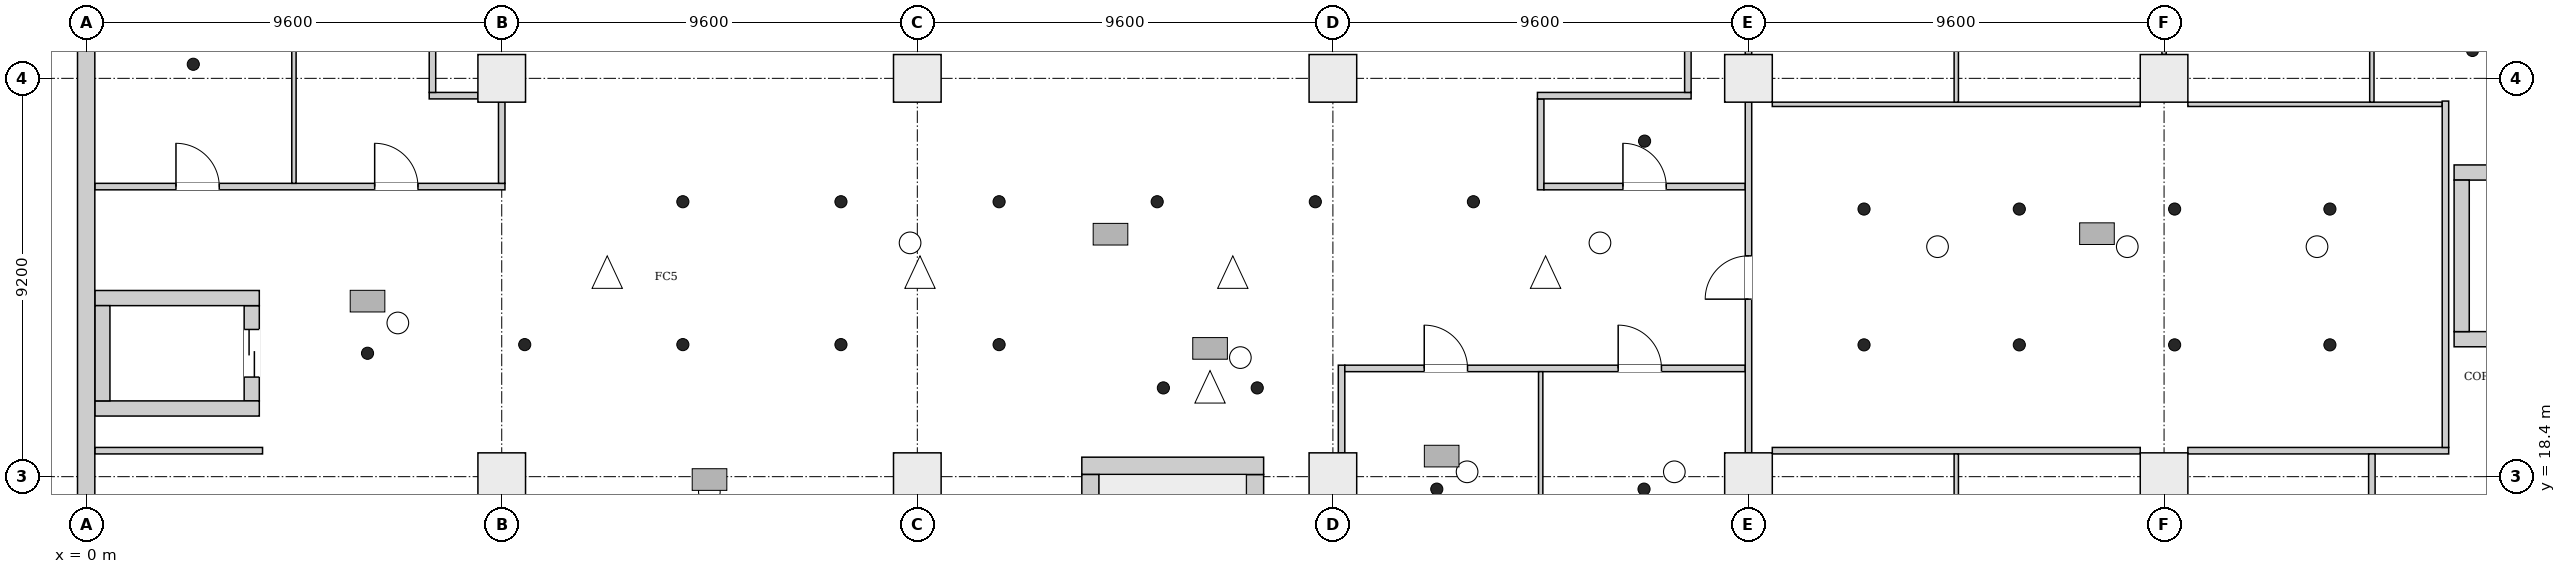
"""IFC4 building model, lengths in metres.
Left out: names, types, materials, properties, quantities, classifications, styles, units other than length and angle.
Written with IfcOpenShell. Run it as: python <this file> out.ifc"""

import sys

from ifc_helpers import new_model, si_unit, direction, frame, frame_2d, origin, origin_2d, place, context, subcontext, project, spatial, rectangle, extrude, element, fill, save


model = new_model("IFC4")
c1 = context("Model", 3, precision=1e-05, world=origin(), true_north=direction((0.0, 1.0)))
c2 = subcontext(c1, "Body", "Model", "MODEL_VIEW")
j1 = project(units=[si_unit("LENGTHUNIT", "METRE"), si_unit("PLANEANGLEUNIT", "RADIAN")], contexts=[c1])
p1 = place(None, origin())
s1 = spatial("IfcSite", under=j1, at=p1, CompositionType="ELEMENT")
p2 = place(p1, origin())
s2 = spatial("IfcBuilding", under=s1, at=p2, CompositionType="ELEMENT")
p3 = place(p2, frame((0.0, 0.0, 26.7)))
s3 = spatial("IfcBuildingStorey", under=s2, at=p3, CompositionType="ELEMENT", Elevation=26.7)
p4 = place(p3, frame((0.0, -0.2, 0.0), z_axis=(0.0, 0.0, 1.0), x_axis=(0.0, 1.0, 0.0)))
e1 = element("IfcWall", 1, at=p4, inside=s3, PredefinedType="SHEAR", context=c2, shape_type="SweptSolid", body=[
    extrude(rectangle(XDim=46.88, YDim=0.4, at=frame_2d((23.44, 0.0))), origin(), (0.0, 0.0, 1.0), 5.2),
])
p5 = place(p3, frame((23.0, 18.65, 0.0), z_axis=(0.0, 0.0, 1.0), x_axis=(1.0, 0.0, 0.0)))
e2 = element("IfcWall", 2, at=p5, inside=s3, PredefinedType="SHEAR", context=c2, shape_type="SweptSolid", body=[
    extrude(rectangle(XDim=4.2, YDim=0.4, at=frame_2d((2.1, 0.0))), origin(), (0.0, 0.0, 1.0), 5.2),
])
for number, where, z_axis, x_axis in (
    (3, (23.2, 11.85, 0.0), (0.0, 0.0, 1.0), (0.0, 1.0, 0.0)),
    (4, (27.0, 11.85, 0.0), (0.0, 0.0, 1.0), (0.0, 1.0, 0.0)),
):
    element("IfcWall", number, at=place(p3, frame(where, z_axis=z_axis, x_axis=x_axis)), inside=s3, PredefinedType="SHEAR", context=c2, shape_type="SweptSolid", body=[
        extrude(rectangle(XDim=6.6, YDim=0.4, at=frame_2d((3.3, 0.0))), origin(), (0.0, 0.0, 1.0), 5.2),
    ])
for number, where, z_axis, x_axis in (
    (5, (0.2, 19.975, 0.0), (0.0, 0.0, 1.0), (1.0, 0.0, 0.0)),
    (6, (0.2, 22.525, 0.0), (0.0, 0.0, 1.0), (1.0, 0.0, 0.0)),
):
    element("IfcWall", number, at=place(p3, frame(where, z_axis=z_axis, x_axis=x_axis)), inside=s3, PredefinedType="SHEAR", context=c2, shape_type="SweptSolid", body=[
        extrude(rectangle(XDim=3.8, YDim=0.35, at=frame_2d((1.9, 0.0))), origin(), (0.0, 0.0, 1.0), 5.2),
    ])
p6 = place(p3, frame((0.375, 20.15, 0.0), z_axis=(0.0, 0.0, 1.0), x_axis=(0.0, 1.0, 0.0)))
e7 = element("IfcWall", 7, at=p6, inside=s3, PredefinedType="SHEAR", context=c2, shape_type="SweptSolid", body=[
    extrude(rectangle(XDim=2.2, YDim=0.35, at=frame_2d((1.1, 0.0))), origin(), (0.0, 0.0, 1.0), 5.2),
])
p7 = place(p3, frame((3.825, 20.15, 0.0), z_axis=(0.0, 0.0, 1.0), x_axis=(0.0, 1.0, 0.0)))
e8 = element("IfcWall", 8, at=p7, inside=s3, PredefinedType="SHEAR", context=c2, shape_type="SweptSolid", body=[
    extrude(rectangle(XDim=2.2, YDim=0.35, at=frame_2d((1.1, 0.0))), origin(), (0.0, 0.0, 1.0), 5.2),
])
p8 = place(p7, frame((0.55, 0.0, 0.0)))
e9 = element("IfcOpeningElement", 9, at=p8, cuts=e8, PredefinedType="OPENING", context=c2, shape_type="SweptSolid", body=[
    extrude(rectangle(XDim=1.1, YDim=2.1, at=frame_2d((0.55, 1.05))), frame((0.0, 0.185, 0.0), z_axis=(0.0, -1.0, 0.0), x_axis=(1.0, 0.0, 0.0)), (0.0, 0.0, 1.0), 0.37),
])
for number, where, z_axis, x_axis in (
    (10, (54.7, 21.575, 0.0), (0.0, 0.0, 1.0), (1.0, 0.0, 0.0)),
    (11, (54.7, 25.425, 0.0), (0.0, 0.0, 1.0), (1.0, 0.0, 0.0)),
):
    element("IfcWall", number, at=place(p3, frame(where, z_axis=z_axis, x_axis=x_axis)), inside=s3, PredefinedType="SHEAR", context=c2, shape_type="SweptSolid", body=[
        extrude(rectangle(XDim=2.7, YDim=0.35, at=frame_2d((1.35, 0.0))), origin(), (0.0, 0.0, 1.0), 5.2),
    ])
p9 = place(p3, frame((54.875, 21.75, 0.0), z_axis=(0.0, 0.0, 1.0), x_axis=(0.0, 1.0, 0.0)))
e12 = element("IfcWall", 12, at=p9, inside=s3, PredefinedType="SHEAR", context=c2, shape_type="SweptSolid", body=[
    extrude(rectangle(XDim=3.5, YDim=0.35, at=frame_2d((1.75, 0.0))), origin(), (0.0, 0.0, 1.0), 5.2),
])
for number, where, z_axis, x_axis in (
    (13, (9.6, 18.4, 0.0), (0.0, 0.0, 1.0), (1.0, 0.0, 0.0)),
    (14, (19.2, 18.4, 0.0), (0.0, 0.0, 1.0), (1.0, 0.0, 0.0)),
    (15, (28.8, 18.4, 0.0), (0.0, 0.0, 1.0), (1.0, 0.0, 0.0)),
    (16, (38.4, 18.4, 0.0), (0.0, 0.0, 1.0), (1.0, 0.0, 0.0)),
    (17, (48.0, 18.4, 0.0), (0.0, 0.0, 1.0), (1.0, 0.0, 0.0)),
    (18, (9.6, 27.6, 0.0), (0.0, 0.0, 1.0), (1.0, 0.0, 0.0)),
    (19, (19.2, 27.6, 0.0), (0.0, 0.0, 1.0), (1.0, 0.0, 0.0)),
    (20, (28.8, 27.6, 0.0), (0.0, 0.0, 1.0), (1.0, 0.0, 0.0)),
    (21, (38.4, 27.6, 0.0), (0.0, 0.0, 1.0), (1.0, 0.0, 0.0)),
    (22, (48.0, 27.6, 0.0), (0.0, 0.0, 1.0), (1.0, 0.0, 0.0)),
):
    element("IfcColumn", number, at=place(p3, frame(where, z_axis=z_axis, x_axis=x_axis)), inside=s3, PredefinedType="COLUMN", context=c2, shape_type="SweptSolid", body=[
        extrude(rectangle(XDim=1.1, YDim=1.1, at=origin_2d()), origin(), (0.0, 0.0, 1.0), 5.2),
    ])
p10 = place(p3, frame((0.206, 19.0, 0.0), z_axis=(0.0, 0.0, 1.0), x_axis=(1.0, 0.0, 0.0)))
e23 = element("IfcWall", 23, at=p10, inside=s3, PredefinedType="PARTITIONING", context=c2, shape_type="SweptSolid", body=[
    extrude(rectangle(XDim=3.869, YDim=0.15, at=frame_2d((1.935, 0.0))), origin(), (0.0, 0.0, 1.0), 4.85),
])
p11 = place(p3, frame((0.206, 25.1, 0.0), z_axis=(0.0, 0.0, 1.0), x_axis=(1.0, 0.0, 0.0)))
e24 = element("IfcWall", 24, at=p11, inside=s3, PredefinedType="PARTITIONING", context=c2, shape_type="SweptSolid", body=[
    extrude(rectangle(XDim=9.469, YDim=0.15, at=frame_2d((4.734, 0.0))), origin(), (0.0, 0.0, 1.0), 4.85),
])
p12 = place(p11, frame((1.869, 0.0, 0.0)))
e25 = element("IfcOpeningElement", 25, at=p12, cuts=e24, PredefinedType="OPENING", context=c2, shape_type="SweptSolid", body=[
    extrude(rectangle(XDim=1.0, YDim=2.1, at=frame_2d((0.5, 1.05))), frame((0.0, 0.085, 0.0), z_axis=(0.0, -1.0, 0.0), x_axis=(1.0, 0.0, 0.0)), (0.0, 0.0, 1.0), 0.17),
])
p13 = place(p11, frame((6.459, 0.0, 0.0)))
e26 = element("IfcOpeningElement", 26, at=p13, cuts=e24, PredefinedType="OPENING", context=c2, shape_type="SweptSolid", body=[
    extrude(rectangle(XDim=1.0, YDim=2.1, at=frame_2d((0.5, 1.05))), frame((0.0, 0.085, 0.0), z_axis=(0.0, -1.0, 0.0), x_axis=(1.0, 0.0, 0.0)), (0.0, 0.0, 1.0), 0.17),
])
p14 = place(p3, frame((4.8, 25.175, 0.0), z_axis=(0.0, 0.0, 1.0), x_axis=(0.0, 1.0, 0.0)))
e27 = element("IfcWall", 27, at=p14, inside=s3, PredefinedType="PARTITIONING", context=c2, shape_type="SweptSolid", body=[
    extrude(rectangle(XDim=9.4, YDim=0.1, at=frame_2d((4.7, 0.0))), origin(), (0.0, 0.0, 1.0), 4.85),
])
p15 = place(p3, frame((7.925, 27.2, 0.0), z_axis=(0.0, 0.0, 1.0), x_axis=(1.0, 0.0, 0.0)))
e28 = element("IfcWall", 28, at=p15, inside=s3, PredefinedType="PARTITIONING", context=c2, shape_type="SweptSolid", body=[
    extrude(rectangle(XDim=1.125, YDim=0.15, at=frame_2d((0.562, 0.0))), origin(), (0.0, 0.0, 1.0), 4.85),
])
p16 = place(p3, frame((8.0, 27.275, 0.0), z_axis=(0.0, 0.0, 1.0), x_axis=(0.0, 1.0, 0.0)))
e29 = element("IfcWall", 29, at=p16, inside=s3, PredefinedType="PARTITIONING", context=c2, shape_type="SweptSolid", body=[
    extrude(rectangle(XDim=3.65, YDim=0.15, at=frame_2d((1.825, 0.0))), origin(), (0.0, 0.0, 1.0), 4.85),
])
p17 = place(p3, frame((9.6, 25.175, 0.0), z_axis=(0.0, 0.0, 1.0), x_axis=(0.0, 1.0, 0.0)))
e30 = element("IfcWall", 30, at=p17, inside=s3, PredefinedType="PARTITIONING", context=c2, shape_type="SweptSolid", body=[
    extrude(rectangle(XDim=1.875, YDim=0.15, at=frame_2d((0.938, 0.0))), origin(), (0.0, 0.0, 1.0), 4.45),
])
p18 = place(p3, frame((29.0, 18.95, 0.0), z_axis=(0.0, 0.0, 1.0), x_axis=(0.0, 1.0, 0.0)))
e31 = element("IfcWall", 31, at=p18, inside=s3, PredefinedType="PARTITIONING", context=c2, shape_type="SweptSolid", body=[
    extrude(rectangle(XDim=2.025, YDim=0.15, at=frame_2d((1.013, 0.0))), origin(), (0.0, 0.0, 1.0), 4.45),
])
p19 = place(p3, frame((29.075, 20.9, 0.0), z_axis=(0.0, 0.0, 1.0), x_axis=(1.0, 0.0, 0.0)))
e32 = element("IfcWall", 32, at=p19, inside=s3, PredefinedType="PARTITIONING", context=c2, shape_type="SweptSolid", body=[
    extrude(rectangle(XDim=9.25, YDim=0.15, at=frame_2d((4.625, 0.0))), origin(), (0.0, 0.0, 1.0), 4.85),
])
p20 = place(p19, frame((1.835, 0.0, 0.0)))
e33 = element("IfcOpeningElement", 33, at=p20, cuts=e32, PredefinedType="OPENING", context=c2, shape_type="SweptSolid", body=[
    extrude(rectangle(XDim=1.0, YDim=2.1, at=frame_2d((0.5, 1.05))), frame((0.0, 0.085, 0.0), z_axis=(0.0, -1.0, 0.0), x_axis=(1.0, 0.0, 0.0)), (0.0, 0.0, 1.0), 0.17),
])
p21 = place(p19, frame((6.315, 0.0, 0.0)))
e34 = element("IfcOpeningElement", 34, at=p21, cuts=e32, PredefinedType="OPENING", context=c2, shape_type="SweptSolid", body=[
    extrude(rectangle(XDim=1.0, YDim=2.1, at=frame_2d((0.5, 1.05))), frame((0.0, 0.085, 0.0), z_axis=(0.0, -1.0, 0.0), x_axis=(1.0, 0.0, 0.0)), (0.0, 0.0, 1.0), 0.17),
])
p22 = place(p3, frame((33.6, 25.025, 0.0), z_axis=(0.0, 0.0, 1.0), x_axis=(0.0, 1.0, 0.0)))
e35 = element("IfcWall", 35, at=p22, inside=s3, PredefinedType="PARTITIONING", context=c2, shape_type="SweptSolid", body=[
    extrude(rectangle(XDim=2.1, YDim=0.15, at=frame_2d((1.05, 0.0))), origin(), (0.0, 0.0, 1.0), 4.85),
])
p23 = place(p3, frame((33.525, 27.2, 0.0), z_axis=(0.0, 0.0, 1.0), x_axis=(1.0, 0.0, 0.0)))
e36 = element("IfcWall", 36, at=p23, inside=s3, PredefinedType="PARTITIONING", context=c2, shape_type="SweptSolid", body=[
    extrude(rectangle(XDim=3.55, YDim=0.15, at=frame_2d((1.775, 0.0))), origin(), (0.0, 0.0, 1.0), 4.85),
])
p24 = place(p3, frame((33.6, 11.575, 0.0), z_axis=(0.0, 0.0, 1.0), x_axis=(0.0, 1.0, 0.0)))
e37 = element("IfcWall", 37, at=p24, inside=s3, PredefinedType="PARTITIONING", context=c2, shape_type="SweptSolid", body=[
    extrude(rectangle(XDim=9.25, YDim=0.1, at=frame_2d((4.625, 0.0))), origin(), (0.0, 0.0, 1.0), 4.85),
])
p25 = place(p3, frame((33.675, 25.1, 0.0), z_axis=(0.0, 0.0, 1.0), x_axis=(1.0, 0.0, 0.0)))
e38 = element("IfcWall", 38, at=p25, inside=s3, PredefinedType="PARTITIONING", context=c2, shape_type="SweptSolid", body=[
    extrude(rectangle(XDim=4.65, YDim=0.15, at=frame_2d((2.325, 0.0))), origin(), (0.0, 0.0, 1.0), 4.85),
])
p26 = place(p25, frame((1.825, 0.0, 0.0)))
e39 = element("IfcOpeningElement", 39, at=p26, cuts=e38, PredefinedType="OPENING", context=c2, shape_type="SweptSolid", body=[
    extrude(rectangle(XDim=1.0, YDim=2.1, at=frame_2d((0.5, 1.05))), frame((0.0, 0.085, 0.0), z_axis=(0.0, -1.0, 0.0), x_axis=(1.0, 0.0, 0.0)), (0.0, 0.0, 1.0), 0.17),
])
p27 = place(p3, frame((37.0, 27.275, 0.0), z_axis=(0.0, 0.0, 1.0), x_axis=(0.0, 1.0, 0.0)))
e40 = element("IfcWall", 40, at=p27, inside=s3, PredefinedType="PARTITIONING", context=c2, shape_type="SweptSolid", body=[
    extrude(rectangle(XDim=3.65, YDim=0.15, at=frame_2d((1.825, 0.0))), origin(), (0.0, 0.0, 1.0), 4.85),
])
p28 = place(p3, frame((38.4, 18.95, 0.0), z_axis=(0.0, 0.0, 1.0), x_axis=(0.0, 1.0, 0.0)))
e41 = element("IfcWall", 41, at=p28, inside=s3, PredefinedType="PARTITIONING", context=c2, shape_type="SweptSolid", body=[
    extrude(rectangle(XDim=8.1, YDim=0.15, at=frame_2d((4.05, 0.0))), origin(), (0.0, 0.0, 1.0), 4.45),
])
p29 = place(p28, frame((3.55, 0.0, 0.0)))
e42 = element("IfcOpeningElement", 42, at=p29, cuts=e41, PredefinedType="OPENING", context=c2, shape_type="SweptSolid", body=[
    extrude(rectangle(XDim=1.0, YDim=2.1, at=frame_2d((0.5, 1.05))), frame((0.0, 0.085, 0.0), z_axis=(0.0, -1.0, 0.0), x_axis=(1.0, 0.0, 0.0)), (0.0, 0.0, 1.0), 0.17),
])
p30 = place(p3, frame((38.4, 28.15, 0.0), z_axis=(0.0, 0.0, 1.0), x_axis=(0.0, 1.0, 0.0)))
e43 = element("IfcWall", 43, at=p30, inside=s3, PredefinedType="PARTITIONING", context=c2, shape_type="SweptSolid", body=[
    extrude(rectangle(XDim=6.425, YDim=0.15, at=frame_2d((3.212, 0.0))), origin(), (0.0, 0.0, 1.0), 4.45),
])
p31 = place(p3, frame((38.95, 19.0, 0.0), z_axis=(0.0, 0.0, 1.0), x_axis=(1.0, 0.0, 0.0)))
e44 = element("IfcWall", 44, at=p31, inside=s3, PredefinedType="PARTITIONING", context=c2, shape_type="SweptSolid", body=[
    extrude(rectangle(XDim=8.5, YDim=0.15, at=frame_2d((4.25, 0.0))), origin(), (0.0, 0.0, 1.0), 4.85),
])
p32 = place(p3, frame((38.95, 27.0, 0.0), z_axis=(0.0, 0.0, 1.0), x_axis=(1.0, 0.0, 0.0)))
e45 = element("IfcWall", 45, at=p32, inside=s3, PredefinedType="PARTITIONING", context=c2, shape_type="SweptSolid", body=[
    extrude(rectangle(XDim=8.5, YDim=0.1, at=frame_2d((4.25, 0.0))), origin(), (0.0, 0.0, 1.0), 4.85),
])
p33 = place(p3, frame((43.2, 11.575, 0.0), z_axis=(0.0, 0.0, 1.0), x_axis=(0.0, 1.0, 0.0)))
e46 = element("IfcWall", 46, at=p33, inside=s3, PredefinedType="PARTITIONING", context=c2, shape_type="SweptSolid", body=[
    extrude(rectangle(XDim=7.35, YDim=0.1, at=frame_2d((3.675, 0.0))), origin(), (0.0, 0.0, 1.0), 4.85),
])
p34 = place(p3, frame((43.2, 27.05, 0.0), z_axis=(0.0, 0.0, 1.0), x_axis=(0.0, 1.0, 0.0)))
e47 = element("IfcWall", 47, at=p34, inside=s3, PredefinedType="PARTITIONING", context=c2, shape_type="SweptSolid", body=[
    extrude(rectangle(XDim=7.525, YDim=0.1, at=frame_2d((3.762, 0.0))), origin(), (0.0, 0.0, 1.0), 4.85),
])
p35 = place(p3, frame((48.0, 28.15, 0.0), z_axis=(0.0, 0.0, 1.0), x_axis=(0.0, 1.0, 0.0)))
e48 = element("IfcWall", 48, at=p35, inside=s3, PredefinedType="PARTITIONING", context=c2, shape_type="SweptSolid", body=[
    extrude(rectangle(XDim=6.425, YDim=0.1, at=frame_2d((3.212, 0.0))), origin(), (0.0, 0.0, 1.0), 4.85),
])
p36 = place(p3, frame((48.55, 19.0, 0.0), z_axis=(0.0, 0.0, 1.0), x_axis=(1.0, 0.0, 0.0)))
e49 = element("IfcWall", 49, at=p36, inside=s3, PredefinedType="PARTITIONING", context=c2, shape_type="SweptSolid", body=[
    extrude(rectangle(XDim=6.025, YDim=0.15, at=frame_2d((3.012, 0.0))), origin(), (0.0, 0.0, 1.0), 4.85),
])
p37 = place(p3, frame((48.55, 27.0, 0.0), z_axis=(0.0, 0.0, 1.0), x_axis=(1.0, 0.0, 0.0)))
e50 = element("IfcWall", 50, at=p37, inside=s3, PredefinedType="PARTITIONING", context=c2, shape_type="SweptSolid", body=[
    extrude(rectangle(XDim=5.875, YDim=0.1, at=frame_2d((2.938, 0.0))), origin(), (0.0, 0.0, 1.0), 4.85),
])
p38 = place(p3, frame((52.8, 11.575, 0.0), z_axis=(0.0, 0.0, 1.0), x_axis=(0.0, 1.0, 0.0)))
e51 = element("IfcWall", 51, at=p38, inside=s3, PredefinedType="PARTITIONING", context=c2, shape_type="SweptSolid", body=[
    extrude(rectangle(XDim=7.35, YDim=0.15, at=frame_2d((3.675, 0.0))), origin(), (0.0, 0.0, 1.0), 4.85),
])
p39 = place(p3, frame((52.8, 27.05, 0.0), z_axis=(0.0, 0.0, 1.0), x_axis=(0.0, 1.0, 0.0)))
e52 = element("IfcWall", 52, at=p39, inside=s3, PredefinedType="PARTITIONING", context=c2, shape_type="SweptSolid", body=[
    extrude(rectangle(XDim=7.525, YDim=0.1, at=frame_2d((3.762, 0.0))), origin(), (0.0, 0.0, 1.0), 4.85),
])
p40 = place(p3, frame((54.5, 19.075, 0.0), z_axis=(0.0, 0.0, 1.0), x_axis=(0.0, 1.0, 0.0)))
e53 = element("IfcWall", 53, at=p40, inside=s3, PredefinedType="PARTITIONING", context=c2, shape_type="SweptSolid", body=[
    extrude(rectangle(XDim=8.0, YDim=0.15, at=frame_2d((4.0, 0.0))), origin(), (0.0, 0.0, 1.0), 4.85),
])
p41 = place(p8, origin())
e54 = element("IfcDoor", 54, at=p41, inside=s3, OperationType="DOUBLE_DOOR_SLIDING", PredefinedType="DOOR", context=c2, shape_type="SweptSolid", body=[
    extrude(rectangle(XDim=1.1, YDim=2.1, at=frame_2d((0.55, 1.05))), frame((0.0, 0.025, 0.0), z_axis=(0.0, -1.0, 0.0), x_axis=(1.0, 0.0, 0.0)), (0.0, 0.0, 1.0), 0.05),
])
fill(e9, e54)
p42 = place(p20, origin())
e55 = element("IfcDoor", 55, at=p42, inside=s3, OperationType="SINGLE_SWING_RIGHT", PredefinedType="DOOR", context=c2, shape_type="SweptSolid", body=[
    extrude(rectangle(XDim=1.0, YDim=2.1, at=frame_2d((0.5, 1.05))), frame((0.0, 0.025, 0.0), z_axis=(0.0, -1.0, 0.0), x_axis=(1.0, 0.0, 0.0)), (0.0, 0.0, 1.0), 0.05),
])
fill(e33, e55)
p43 = place(p21, origin())
e56 = element("IfcDoor", 56, at=p43, inside=s3, OperationType="SINGLE_SWING_LEFT", PredefinedType="DOOR", context=c2, shape_type="SweptSolid", body=[
    extrude(rectangle(XDim=1.0, YDim=2.1, at=frame_2d((0.5, 1.05))), frame((0.0, 0.025, 0.0), z_axis=(0.0, -1.0, 0.0), x_axis=(1.0, 0.0, 0.0)), (0.0, 0.0, 1.0), 0.05),
])
fill(e34, e56)
p44 = place(p12, origin())
e57 = element("IfcDoor", 57, at=p44, inside=s3, OperationType="SINGLE_SWING_LEFT", PredefinedType="DOOR", context=c2, shape_type="SweptSolid", body=[
    extrude(rectangle(XDim=1.0, YDim=2.1, at=frame_2d((0.5, 1.05))), frame((0.0, 0.025, 0.0), z_axis=(0.0, -1.0, 0.0), x_axis=(1.0, 0.0, 0.0)), (0.0, 0.0, 1.0), 0.05),
])
fill(e25, e57)
p45 = place(p13, origin())
e58 = element("IfcDoor", 58, at=p45, inside=s3, OperationType="SINGLE_SWING_RIGHT", PredefinedType="DOOR", context=c2, shape_type="SweptSolid", body=[
    extrude(rectangle(XDim=1.0, YDim=2.1, at=frame_2d((0.5, 1.05))), frame((0.0, 0.025, 0.0), z_axis=(0.0, -1.0, 0.0), x_axis=(1.0, 0.0, 0.0)), (0.0, 0.0, 1.0), 0.05),
])
fill(e26, e58)
p46 = place(p26, origin())
e59 = element("IfcDoor", 59, at=p46, inside=s3, OperationType="SINGLE_SWING_LEFT", PredefinedType="DOOR", context=c2, shape_type="SweptSolid", body=[
    extrude(rectangle(XDim=1.0, YDim=2.1, at=frame_2d((0.5, 1.05))), frame((0.0, 0.025, 0.0), z_axis=(0.0, -1.0, 0.0), x_axis=(1.0, 0.0, 0.0)), (0.0, 0.0, 1.0), 0.05),
])
fill(e39, e59)
p47 = place(p29, origin())
e60 = element("IfcDoor", 60, at=p47, inside=s3, OperationType="SINGLE_SWING_RIGHT", PredefinedType="DOOR", context=c2, shape_type="SweptSolid", body=[
    extrude(rectangle(XDim=1.0, YDim=2.1, at=frame_2d((0.5, 1.05))), frame((0.0, 0.025, 0.0), z_axis=(0.0, -1.0, 0.0), x_axis=(1.0, 0.0, 0.0)), (0.0, 0.0, 1.0), 0.05),
])
fill(e42, e60)
save(model, sys.argv[1])
